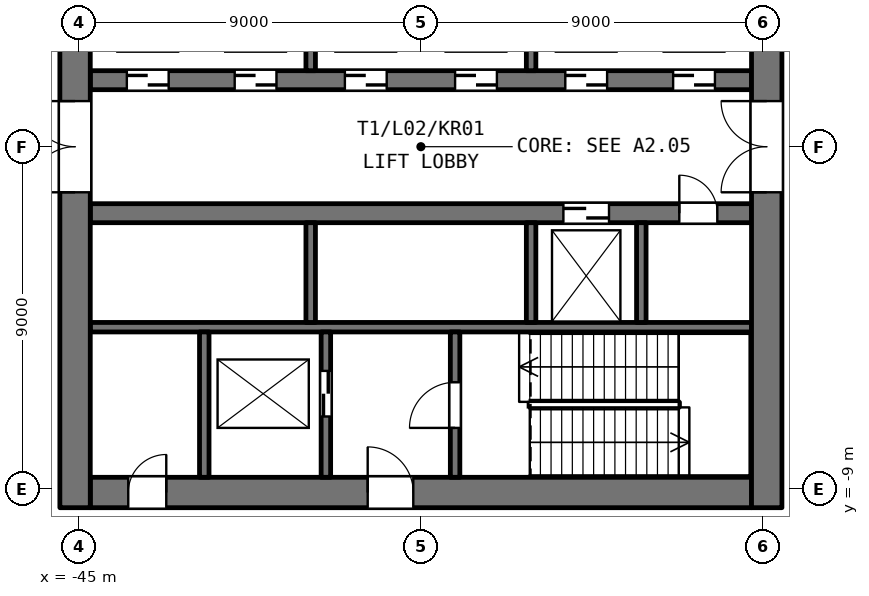
"""IFC4 building model, lengths in metres.
Left out: names, types, materials, properties, quantities, classifications, styles, units other than length and angle.
Written with IfcOpenShell. Run it as: python <this file> out.ifc"""

import sys

from ifc_helpers import new_model, si_unit, direction, frame, frame_2d, origin, place, context, subcontext, project, spatial, rectangle, extrude, element, fill, save


model = new_model("IFC4")
c1 = context("Model", 3, precision=1e-05, world=origin(), true_north=direction((0.0, 1.0)))
c2 = subcontext(c1, "Body", "Model", "MODEL_VIEW")
j1 = project(units=[si_unit("LENGTHUNIT", "METRE"), si_unit("PLANEANGLEUNIT", "RADIAN")], contexts=[c1])
p1 = place(None, origin())
s1 = spatial("IfcSite", under=j1, at=p1, CompositionType="ELEMENT")
p2 = place(p1, origin())
s2 = spatial("IfcBuilding", under=s1, at=p2, CompositionType="ELEMENT")
p3 = place(p2, frame((0.0, 0.0, 12.6)))
s3 = spatial("IfcBuildingStorey", under=s2, at=p3, CompositionType="ELEMENT", Elevation=12.6)
p4 = place(p3, frame((-44.7, -9.1, 0.0), z_axis=(0.0, 0.0, 1.0), x_axis=(1.0, 0.0, 0.0)))
e1 = element("IfcWall", 1, at=p4, inside=s3, PredefinedType="SHEAR", context=c2, shape_type="SweptSolid", body=[
    extrude(rectangle(XDim=17.4, YDim=0.8, at=frame_2d((8.7, 0.0))), origin(), (0.0, 0.0, 1.0), 5.1),
])
p5 = place(p4, frame((7.3, 0.0, 0.0)))
e2 = element("IfcOpeningElement", 2, at=p5, cuts=e1, PredefinedType="OPENING", context=c2, shape_type="SweptSolid", body=[
    extrude(rectangle(XDim=1.2, YDim=2.1, at=frame_2d((0.6, 1.05))), frame((0.0, 0.41, 0.0), z_axis=(0.0, -1.0, 0.0), x_axis=(1.0, 0.0, 0.0)), (0.0, 0.0, 1.0), 0.82),
])
p6 = place(p4, frame((1.0, 0.0, 0.0)))
e3 = element("IfcOpeningElement", 3, at=p6, cuts=e1, PredefinedType="OPENING", context=c2, shape_type="SweptSolid", body=[
    extrude(rectangle(XDim=1.0, YDim=2.1, at=frame_2d((0.5, 1.05))), frame((0.0, 0.41, 0.0), z_axis=(0.0, -1.0, 0.0), x_axis=(1.0, 0.0, 0.0)), (0.0, 0.0, 1.0), 0.82),
])
p7 = place(p3, frame((-44.7, -4.75, 0.0), z_axis=(0.0, 0.0, 1.0), x_axis=(1.0, 0.0, 0.0)))
e4 = element("IfcWall", 4, at=p7, inside=s3, PredefinedType="SHEAR", context=c2, shape_type="SweptSolid", body=[
    extrude(rectangle(XDim=17.4, YDim=0.25, at=frame_2d((8.7, 0.0))), origin(), (0.0, 0.0, 1.0), 5.1),
])
p8 = place(p3, frame((-44.7, -1.75, 0.0), z_axis=(0.0, 0.0, 1.0), x_axis=(1.0, 0.0, 0.0)))
e5 = element("IfcWall", 5, at=p8, inside=s3, PredefinedType="SHEAR", context=c2, shape_type="SweptSolid", body=[
    extrude(rectangle(XDim=17.4, YDim=0.5, at=frame_2d((8.7, 0.0))), origin(), (0.0, 0.0, 1.0), 5.1),
])
p9 = place(p8, frame((12.45, 0.0, 0.0)))
e6 = element("IfcOpeningElement", 6, at=p9, cuts=e5, PredefinedType="OPENING", context=c2, shape_type="SweptSolid", body=[
    extrude(rectangle(XDim=1.2, YDim=2.1, at=frame_2d((0.6, 1.05))), frame((0.0, 0.26, 0.0), z_axis=(0.0, -1.0, 0.0), x_axis=(1.0, 0.0, 0.0)), (0.0, 0.0, 1.0), 0.52),
])
p10 = place(p8, frame((15.5, 0.0, 0.0)))
e7 = element("IfcOpeningElement", 7, at=p10, cuts=e5, PredefinedType="OPENING", context=c2, shape_type="SweptSolid", body=[
    extrude(rectangle(XDim=1.0, YDim=2.1, at=frame_2d((0.5, 1.05))), frame((0.0, 0.26, 0.0), z_axis=(0.0, -1.0, 0.0), x_axis=(1.0, 0.0, 0.0)), (0.0, 0.0, 1.0), 0.52),
])
p11 = place(p3, frame((-44.7, 1.75, 0.0), z_axis=(0.0, 0.0, 1.0), x_axis=(1.0, 0.0, 0.0)))
e8 = element("IfcWall", 8, at=p11, inside=s3, PredefinedType="SHEAR", context=c2, shape_type="SweptSolid", body=[
    extrude(rectangle(XDim=17.4, YDim=0.5, at=frame_2d((8.7, 0.0))), origin(), (0.0, 0.0, 1.0), 5.1),
])
p12 = place(p11, frame((0.962, 0.0, 0.0)))
e9 = element("IfcOpeningElement", 9, at=p12, cuts=e8, PredefinedType="OPENING", context=c2, shape_type="SweptSolid", body=[
    extrude(rectangle(XDim=1.1, YDim=2.1, at=frame_2d((0.55, 1.05))), frame((0.0, 0.26, 0.0), z_axis=(0.0, -1.0, 0.0), x_axis=(1.0, 0.0, 0.0)), (0.0, 0.0, 1.0), 0.52),
])
p13 = place(p11, frame((3.8, 0.0, 0.0)))
e10 = element("IfcOpeningElement", 10, at=p13, cuts=e8, PredefinedType="OPENING", context=c2, shape_type="SweptSolid", body=[
    extrude(rectangle(XDim=1.1, YDim=2.1, at=frame_2d((0.55, 1.05))), frame((0.0, 0.26, 0.0), z_axis=(0.0, -1.0, 0.0), x_axis=(1.0, 0.0, 0.0)), (0.0, 0.0, 1.0), 0.52),
])
p14 = place(p11, frame((6.7, 0.0, 0.0)))
e11 = element("IfcOpeningElement", 11, at=p14, cuts=e8, PredefinedType="OPENING", context=c2, shape_type="SweptSolid", body=[
    extrude(rectangle(XDim=1.1, YDim=2.1, at=frame_2d((0.55, 1.05))), frame((0.0, 0.26, 0.0), z_axis=(0.0, -1.0, 0.0), x_axis=(1.0, 0.0, 0.0)), (0.0, 0.0, 1.0), 0.52),
])
p15 = place(p11, frame((9.6, 0.0, 0.0)))
e12 = element("IfcOpeningElement", 12, at=p15, cuts=e8, PredefinedType="OPENING", context=c2, shape_type="SweptSolid", body=[
    extrude(rectangle(XDim=1.1, YDim=2.1, at=frame_2d((0.55, 1.05))), frame((0.0, 0.26, 0.0), z_axis=(0.0, -1.0, 0.0), x_axis=(1.0, 0.0, 0.0)), (0.0, 0.0, 1.0), 0.52),
])
p16 = place(p11, frame((12.5, 0.0, 0.0)))
e13 = element("IfcOpeningElement", 13, at=p16, cuts=e8, PredefinedType="OPENING", context=c2, shape_type="SweptSolid", body=[
    extrude(rectangle(XDim=1.1, YDim=2.1, at=frame_2d((0.55, 1.05))), frame((0.0, 0.26, 0.0), z_axis=(0.0, -1.0, 0.0), x_axis=(1.0, 0.0, 0.0)), (0.0, 0.0, 1.0), 0.52),
])
p17 = place(p11, frame((15.337, 0.0, 0.0)))
e14 = element("IfcOpeningElement", 14, at=p17, cuts=e8, PredefinedType="OPENING", context=c2, shape_type="SweptSolid", body=[
    extrude(rectangle(XDim=1.1, YDim=2.1, at=frame_2d((0.55, 1.05))), frame((0.0, 0.26, 0.0), z_axis=(0.0, -1.0, 0.0), x_axis=(1.0, 0.0, 0.0)), (0.0, 0.0, 1.0), 0.52),
])
p18 = place(p3, frame((-45.1, -9.5, 0.0), z_axis=(0.0, 0.0, 1.0), x_axis=(0.0, 1.0, 0.0)))
e15 = element("IfcWall", 15, at=p18, inside=s3, PredefinedType="SHEAR", context=c2, shape_type="SweptSolid", body=[
    extrude(rectangle(XDim=19.0, YDim=0.8, at=frame_2d((9.5, 0.0))), origin(), (0.0, 0.0, 1.0), 5.1),
])
p19 = place(p18, frame((8.3, 0.0, 0.0)))
e16 = element("IfcOpeningElement", 16, at=p19, cuts=e15, PredefinedType="OPENING", context=c2, shape_type="SweptSolid", body=[
    extrude(rectangle(XDim=2.4, YDim=2.1, at=frame_2d((1.2, 1.05))), frame((0.0, 0.41, 0.0), z_axis=(0.0, -1.0, 0.0), x_axis=(1.0, 0.0, 0.0)), (0.0, 0.0, 1.0), 0.82),
])
p20 = place(p3, frame((-41.7, -8.7, 0.0), z_axis=(0.0, 0.0, 1.0), x_axis=(0.0, 1.0, 0.0)))
e17 = element("IfcWall", 17, at=p20, inside=s3, PredefinedType="SHEAR", context=c2, shape_type="SweptSolid", body=[
    extrude(rectangle(XDim=3.825, YDim=0.25, at=frame_2d((1.913, 0.0))), origin(), (0.0, 0.0, 1.0), 5.1),
])
for number, where, z_axis, x_axis in (
    (18, (-38.9, -4.625, 0.0), (0.0, 0.0, 1.0), (0.0, 1.0, 0.0)),
    (19, (-38.9, 2.0, 0.0), (0.0, 0.0, 1.0), (0.0, 1.0, 0.0)),
):
    element("IfcWall", number, at=place(p3, frame(where, z_axis=z_axis, x_axis=x_axis)), inside=s3, PredefinedType="SHEAR", context=c2, shape_type="SweptSolid", body=[
        extrude(rectangle(XDim=2.625, YDim=0.25, at=frame_2d((1.312, 0.0))), origin(), (0.0, 0.0, 1.0), 5.1),
    ])
p21 = place(p3, frame((-38.5, -8.7, 0.0), z_axis=(0.0, 0.0, 1.0), x_axis=(0.0, 1.0, 0.0)))
e20 = element("IfcWall", 20, at=p21, inside=s3, PredefinedType="SHEAR", context=c2, shape_type="SweptSolid", body=[
    extrude(rectangle(XDim=3.825, YDim=0.25, at=frame_2d((1.913, 0.0))), origin(), (0.0, 0.0, 1.0), 5.1),
])
p22 = place(p21, frame((1.6, 0.0, 0.0)))
e21 = element("IfcOpeningElement", 21, at=p22, cuts=e20, PredefinedType="OPENING", context=c2, shape_type="SweptSolid", body=[
    extrude(rectangle(XDim=1.2, YDim=2.1, at=frame_2d((0.6, 1.05))), frame((0.0, 0.135, 0.0), z_axis=(0.0, -1.0, 0.0), x_axis=(1.0, 0.0, 0.0)), (0.0, 0.0, 1.0), 0.27),
])
p23 = place(p3, frame((-35.1, -8.7, 0.0), z_axis=(0.0, 0.0, 1.0), x_axis=(0.0, 1.0, 0.0)))
e22 = element("IfcWall", 22, at=p23, inside=s3, PredefinedType="SHEAR", context=c2, shape_type="SweptSolid", body=[
    extrude(rectangle(XDim=3.825, YDim=0.25, at=frame_2d((1.913, 0.0))), origin(), (0.0, 0.0, 1.0), 5.1),
])
p24 = place(p23, frame((1.3, 0.0, 0.0)))
e23 = element("IfcOpeningElement", 23, at=p24, cuts=e22, PredefinedType="OPENING", context=c2, shape_type="SweptSolid", body=[
    extrude(rectangle(XDim=1.2, YDim=2.1, at=frame_2d((0.6, 1.05))), frame((0.0, 0.135, 0.0), z_axis=(0.0, -1.0, 0.0), x_axis=(1.0, 0.0, 0.0)), (0.0, 0.0, 1.0), 0.27),
])
for number, where, z_axis, x_axis in (
    (24, (-33.1, -4.625, 0.0), (0.0, 0.0, 1.0), (0.0, 1.0, 0.0)),
    (25, (-33.1, 2.0, 0.0), (0.0, 0.0, 1.0), (0.0, 1.0, 0.0)),
    (26, (-30.2, -4.625, 0.0), (0.0, 0.0, 1.0), (0.0, 1.0, 0.0)),
):
    element("IfcWall", number, at=place(p3, frame(where, z_axis=z_axis, x_axis=x_axis)), inside=s3, PredefinedType="SHEAR", context=c2, shape_type="SweptSolid", body=[
        extrude(rectangle(XDim=2.625, YDim=0.25, at=frame_2d((1.312, 0.0))), origin(), (0.0, 0.0, 1.0), 5.1),
    ])
p25 = place(p3, frame((-26.9, -9.5, 0.0), z_axis=(0.0, 0.0, 1.0), x_axis=(0.0, 1.0, 0.0)))
e27 = element("IfcWall", 27, at=p25, inside=s3, PredefinedType="SHEAR", context=c2, shape_type="SweptSolid", body=[
    extrude(rectangle(XDim=19.0, YDim=0.8, at=frame_2d((9.5, 0.0))), origin(), (0.0, 0.0, 1.0), 5.1),
])
p26 = place(p25, frame((8.3, 0.0, 0.0)))
e28 = element("IfcOpeningElement", 28, at=p26, cuts=e27, PredefinedType="OPENING", context=c2, shape_type="SweptSolid", body=[
    extrude(rectangle(XDim=2.4, YDim=2.1, at=frame_2d((1.2, 1.05))), frame((0.0, 0.41, 0.0), z_axis=(0.0, -1.0, 0.0), x_axis=(1.0, 0.0, 0.0)), (0.0, 0.0, 1.0), 0.82),
])
p27 = place(p19, origin())
e29 = element("IfcDoor", 29, at=p27, inside=s3, OperationType="DOUBLE_DOOR_SINGLE_SWING", PredefinedType="DOOR", context=c2, shape_type="SweptSolid", body=[
    extrude(rectangle(XDim=2.4, YDim=2.1, at=frame_2d((1.2, 1.05))), frame((0.0, -0.225, 0.0), z_axis=(0.0, -1.0, 0.0), x_axis=(1.0, 0.0, 0.0)), (0.0, 0.0, 1.0), 0.05),
])
fill(e16, e29)
p28 = place(p26, origin())
e30 = element("IfcDoor", 30, at=p28, inside=s3, OperationType="DOUBLE_DOOR_SINGLE_SWING", PredefinedType="DOOR", context=c2, shape_type="SweptSolid", body=[
    extrude(rectangle(XDim=2.4, YDim=2.1, at=frame_2d((1.2, 1.05))), frame((0.0, 0.275, 0.0), z_axis=(0.0, -1.0, 0.0), x_axis=(1.0, 0.0, 0.0)), (0.0, 0.0, 1.0), 0.05),
])
fill(e28, e30)
p29 = place(p12, origin())
e31 = element("IfcDoor", 31, at=p29, inside=s3, OperationType="SLIDING_TO_LEFT", PredefinedType="DOOR", context=c2, shape_type="SweptSolid", body=[
    extrude(rectangle(XDim=1.1, YDim=2.1, at=frame_2d((0.55, 1.05))), frame((0.0, 0.025, 0.0), z_axis=(0.0, -1.0, 0.0), x_axis=(1.0, 0.0, 0.0)), (0.0, 0.0, 1.0), 0.05),
])
fill(e9, e31)
p30 = place(p13, origin())
e32 = element("IfcDoor", 32, at=p30, inside=s3, OperationType="SLIDING_TO_LEFT", PredefinedType="DOOR", context=c2, shape_type="SweptSolid", body=[
    extrude(rectangle(XDim=1.1, YDim=2.1, at=frame_2d((0.55, 1.05))), frame((0.0, 0.025, 0.0), z_axis=(0.0, -1.0, 0.0), x_axis=(1.0, 0.0, 0.0)), (0.0, 0.0, 1.0), 0.05),
])
fill(e10, e32)
p31 = place(p14, origin())
e33 = element("IfcDoor", 33, at=p31, inside=s3, OperationType="SLIDING_TO_LEFT", PredefinedType="DOOR", context=c2, shape_type="SweptSolid", body=[
    extrude(rectangle(XDim=1.1, YDim=2.1, at=frame_2d((0.55, 1.05))), frame((0.0, 0.025, 0.0), z_axis=(0.0, -1.0, 0.0), x_axis=(1.0, 0.0, 0.0)), (0.0, 0.0, 1.0), 0.05),
])
fill(e11, e33)
p32 = place(p15, origin())
e34 = element("IfcDoor", 34, at=p32, inside=s3, OperationType="SLIDING_TO_LEFT", PredefinedType="DOOR", context=c2, shape_type="SweptSolid", body=[
    extrude(rectangle(XDim=1.1, YDim=2.1, at=frame_2d((0.55, 1.05))), frame((0.0, 0.025, 0.0), z_axis=(0.0, -1.0, 0.0), x_axis=(1.0, 0.0, 0.0)), (0.0, 0.0, 1.0), 0.05),
])
fill(e12, e34)
p33 = place(p16, origin())
e35 = element("IfcDoor", 35, at=p33, inside=s3, OperationType="SLIDING_TO_LEFT", PredefinedType="DOOR", context=c2, shape_type="SweptSolid", body=[
    extrude(rectangle(XDim=1.1, YDim=2.1, at=frame_2d((0.55, 1.05))), frame((0.0, 0.025, 0.0), z_axis=(0.0, -1.0, 0.0), x_axis=(1.0, 0.0, 0.0)), (0.0, 0.0, 1.0), 0.05),
])
fill(e13, e35)
p34 = place(p17, origin())
e36 = element("IfcDoor", 36, at=p34, inside=s3, OperationType="SLIDING_TO_LEFT", PredefinedType="DOOR", context=c2, shape_type="SweptSolid", body=[
    extrude(rectangle(XDim=1.1, YDim=2.1, at=frame_2d((0.55, 1.05))), frame((0.0, 0.025, 0.0), z_axis=(0.0, -1.0, 0.0), x_axis=(1.0, 0.0, 0.0)), (0.0, 0.0, 1.0), 0.05),
])
fill(e14, e36)
p35 = place(p9, origin())
e37 = element("IfcDoor", 37, at=p35, inside=s3, OperationType="SLIDING_TO_LEFT", PredefinedType="DOOR", context=c2, shape_type="SweptSolid", body=[
    extrude(rectangle(XDim=1.2, YDim=2.1, at=frame_2d((0.6, 1.05))), frame((0.0, 0.025, 0.0), z_axis=(0.0, -1.0, 0.0), x_axis=(1.0, 0.0, 0.0)), (0.0, 0.0, 1.0), 0.05),
])
fill(e6, e37)
p36 = place(p22, origin())
e38 = element("IfcDoor", 38, at=p36, inside=s3, OperationType="SLIDING_TO_LEFT", PredefinedType="DOOR", context=c2, shape_type="SweptSolid", body=[
    extrude(rectangle(XDim=1.2, YDim=2.1, at=frame_2d((0.6, 1.05))), frame((0.0, 0.025, 0.0), z_axis=(0.0, -1.0, 0.0), x_axis=(1.0, 0.0, 0.0)), (0.0, 0.0, 1.0), 0.05),
])
fill(e21, e38)
p37 = place(p10, origin())
e39 = element("IfcDoor", 39, at=p37, inside=s3, OperationType="SINGLE_SWING_LEFT", PredefinedType="DOOR", context=c2, shape_type="SweptSolid", body=[
    extrude(rectangle(XDim=1.0, YDim=2.1, at=frame_2d((0.5, 1.05))), frame((0.0, 0.025, 0.0), z_axis=(0.0, -1.0, 0.0), x_axis=(1.0, 0.0, 0.0)), (0.0, 0.0, 1.0), 0.05),
])
fill(e7, e39)
p38 = place(p24, origin())
e40 = element("IfcDoor", 40, at=p38, inside=s3, OperationType="SINGLE_SWING_LEFT", PredefinedType="DOOR", context=c2, shape_type="SweptSolid", body=[
    extrude(rectangle(XDim=1.2, YDim=2.1, at=frame_2d((0.6, 1.05))), frame((0.0, 0.025, 0.0), z_axis=(0.0, -1.0, 0.0), x_axis=(1.0, 0.0, 0.0)), (0.0, 0.0, 1.0), 0.05),
])
fill(e23, e40)
p39 = place(p5, origin())
e41 = element("IfcDoor", 41, at=p39, inside=s3, OperationType="SINGLE_SWING_LEFT", PredefinedType="DOOR", context=c2, shape_type="SweptSolid", body=[
    extrude(rectangle(XDim=1.2, YDim=2.1, at=frame_2d((0.6, 1.05))), frame((0.0, 0.275, 0.0), z_axis=(0.0, -1.0, 0.0), x_axis=(1.0, 0.0, 0.0)), (0.0, 0.0, 1.0), 0.05),
])
fill(e2, e41)
p40 = place(p6, origin())
e42 = element("IfcDoor", 42, at=p40, inside=s3, OperationType="SINGLE_SWING_RIGHT", PredefinedType="DOOR", context=c2, shape_type="SweptSolid", body=[
    extrude(rectangle(XDim=1.0, YDim=2.1, at=frame_2d((0.5, 1.05))), frame((0.0, 0.275, 0.0), z_axis=(0.0, -1.0, 0.0), x_axis=(1.0, 0.0, 0.0)), (0.0, 0.0, 1.0), 0.05),
])
fill(e3, e42)
save(model, sys.argv[1])
